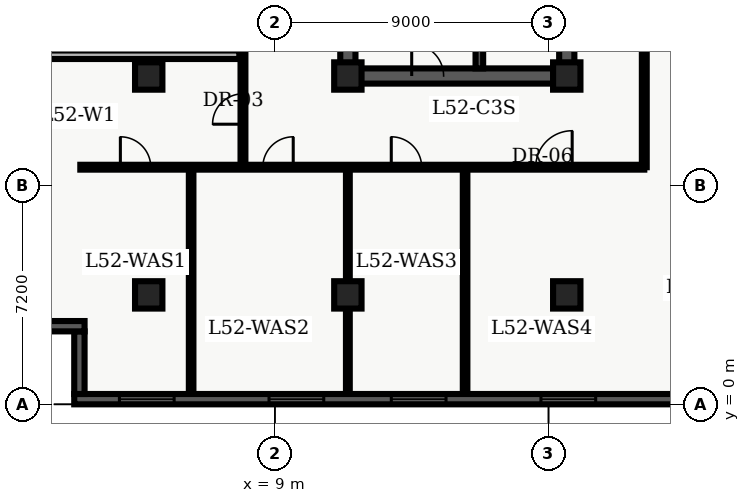
"""IFC4 building model, lengths in metres.
Left out: names, types, materials, properties, quantities, classifications, styles, units other than length and angle.
Written with IfcOpenShell. Run it as: python <this file> out.ifc"""

import sys

from ifc_helpers import new_model, entity, si_unit, converted_unit, direction, frame, origin_with_axes, origin_2d_with_axis, place, context, subcontext, project, spatial, polyline, rectangle, outline, extrude, element, fill, save


model = new_model("IFC4")
c1 = context("Model", 3, precision=1e-05, world=origin_with_axes(), true_north=direction((0.0, 1.0)))
c2 = subcontext(c1, "Body", "Model", "MODEL_VIEW")
j1 = project(units=[si_unit("LENGTHUNIT", "METRE"), converted_unit("PLANEANGLEUNIT", "DEGREE", entity("IfcPlaneAngleMeasure", 0.017), si_unit("PLANEANGLEUNIT", "RADIAN"), dimensions=[0, 0, 0, 0, 0, 0, 0])], contexts=[c1])
p1 = place(None, origin_with_axes())
s1 = spatial("IfcSite", under=j1, at=p1, CompositionType="ELEMENT")
p2 = place(p1, origin_with_axes())
s2 = spatial("IfcBuilding", under=s1, at=p2, CompositionType="ELEMENT")
p3 = place(p2, frame((0.0, 0.0, 212.1), z_axis=(0.0, 0.0, 1.0), x_axis=(1.0, 0.0, 0.0)))
s3 = spatial("IfcBuildingStorey", under=s2, at=p3, CompositionType="ELEMENT", Elevation=212.1)
p4 = place(p3, frame((11.4, 10.8, 0.0), z_axis=(0.0, 0.0, 1.0), x_axis=(0.0, 1.0, 0.0)))
e1 = element("IfcWall", 1, at=p4, inside=s3, PredefinedType="SHEAR", context=c2, shape_type="SweptSolid", body=[
    extrude(outline(polyline([(0.0, -0.25), (27.0, -0.25), (27.0, 0.25), (0.0, 0.25), (0.0, -0.25)])), origin_with_axes(), (0.0, 0.0, 1.0), 3.66),
])
p5 = place(p3, frame((11.4, 10.8, 0.0), z_axis=(0.0, 0.0, 1.0), x_axis=(1.0, 0.0, 0.0)))
e2 = element("IfcWall", 2, at=p5, inside=s3, PredefinedType="SHEAR", context=c2, shape_type="SweptSolid", body=[
    extrude(outline(polyline([(0.0, -0.25), (7.2, -0.25), (7.2, 0.25), (0.0, 0.25), (0.0, -0.25)])), origin_with_axes(), (0.0, 0.0, 1.0), 3.66),
])
p6 = place(p5, frame((2.625, 0.0, 0.0), z_axis=(0.0, 0.0, 1.0), x_axis=(1.0, 0.0, 0.0)))
e3 = element("IfcOpeningElement", 3, at=p6, cuts=e2, PredefinedType="OPENING", context=c2, shape_type="SweptSolid", body=[
    extrude(rectangle(XDim=1.05, YDim=0.52, at=origin_2d_with_axis()), origin_with_axes(), (0.0, 0.0, 1.0), 2.15),
])
p7 = place(p3, frame((18.6, 10.8, 0.0), z_axis=(0.0, 0.0, 1.0), x_axis=(0.0, 1.0, 0.0)))
e4 = element("IfcWall", 4, at=p7, inside=s3, PredefinedType="SHEAR", context=c2, shape_type="SweptSolid", body=[
    extrude(outline(polyline([(0.0, -0.25), (13.5, -0.25), (13.5, 0.25), (0.0, 0.25), (0.0, -0.25)])), origin_with_axes(), (0.0, 0.0, 1.0), 3.66),
])
p8 = place(p7, frame((11.125, 0.0, 0.0), z_axis=(0.0, 0.0, 1.0), x_axis=(1.0, 0.0, 0.0)))
e5 = element("IfcOpeningElement", 5, at=p8, cuts=e4, PredefinedType="OPENING", context=c2, shape_type="SweptSolid", body=[
    extrude(rectangle(XDim=1.05, YDim=0.52, at=origin_2d_with_axis()), origin_with_axes(), (0.0, 0.0, 1.0), 2.15),
])
p9 = place(p7, frame((2.125, 0.0, 0.0), z_axis=(0.0, 0.0, 1.0), x_axis=(1.0, 0.0, 0.0)))
e6 = element("IfcOpeningElement", 6, at=p9, cuts=e4, PredefinedType="OPENING", context=c2, shape_type="SweptSolid", body=[
    extrude(rectangle(XDim=0.95, YDim=0.52, at=origin_2d_with_axis()), origin_with_axes(), (0.0, 0.0, 1.0), 2.15),
])
p10 = place(p7, frame((6.275, 0.0, 0.0), z_axis=(0.0, 0.0, 1.0), x_axis=(1.0, 0.0, 0.0)))
e7 = element("IfcOpeningElement", 7, at=p10, cuts=e4, PredefinedType="OPENING", context=c2, shape_type="SweptSolid", body=[
    extrude(rectangle(XDim=0.95, YDim=0.52, at=origin_2d_with_axis()), origin_with_axes(), (0.0, 0.0, 1.0), 2.15),
])
p11 = place(p3, frame((15.725, 11.05, 0.0), z_axis=(0.0, 0.0, 1.0), x_axis=(0.0, 1.0, 0.0)))
e8 = element("IfcWall", 8, at=p11, inside=s3, PredefinedType="SHEAR", context=c2, shape_type="SweptSolid", body=[
    extrude(outline(polyline([(0.0, -0.125), (8.65, -0.125), (8.65, 0.125), (0.0, 0.125), (0.0, -0.125)])), origin_with_axes(), (0.0, 0.0, 1.0), 3.66),
])
for number, where, z_axis, x_axis in (
    (9, (11.4, 3.6, 0.0), (0.0, 0.0, 1.0), (1.0, 0.0, 0.0)),
    (10, (11.4, 10.8, 0.0), (0.0, 0.0, 1.0), (1.0, 0.0, 0.0)),
    (11, (18.6, 3.6, 0.0), (0.0, 0.0, 1.0), (1.0, 0.0, 0.0)),
    (12, (18.6, 10.8, 0.0), (0.0, 0.0, 1.0), (1.0, 0.0, 0.0)),
    (13, (4.85, 3.6, 0.0), (0.0, 0.0, 1.0), (1.0, 0.0, 0.0)),
    (14, (4.85, 10.8, 0.0), (0.0, 0.0, 1.0), (1.0, 0.0, 0.0)),
):
    element("IfcColumn", number, at=place(p3, frame(where, z_axis=z_axis, x_axis=x_axis)), inside=s3, PredefinedType="COLUMN", context=c2, shape_type="SweptSolid", body=[
        extrude(rectangle(XDim=0.9, YDim=0.9, at=origin_2d_with_axis()), origin_with_axes(), (0.0, 0.0, 1.0), 3.9),
    ])
p12 = place(p3, frame((2.6, 7.8, 0.0), z_axis=(0.0, 0.0, 1.0), x_axis=(1.0, 0.0, 0.0)))
e15 = element("IfcWall", 15, at=p12, inside=s3, PredefinedType="PARTITIONING", context=c2, shape_type="SweptSolid", body=[
    extrude(outline(polyline([(0.0, -0.08), (18.55, -0.08), (18.55, 0.08), (0.0, 0.08), (0.0, -0.08)])), origin_with_axes(), (0.0, 0.0, 1.0), 2.7),
])
p13 = place(p12, frame((1.817, 0.0, 0.0), z_axis=(0.0, 0.0, 1.0), x_axis=(1.0, 0.0, 0.0)))
e16 = element("IfcOpeningElement", 16, at=p13, cuts=e15, PredefinedType="OPENING", context=c2, shape_type="SweptSolid", body=[
    extrude(rectangle(XDim=1.0, YDim=0.18, at=origin_2d_with_axis()), origin_with_axes(), (0.0, 0.0, 1.0), 2.15),
])
p14 = place(p12, frame((6.503, 0.0, 0.0), z_axis=(0.0, 0.0, 1.0), x_axis=(1.0, 0.0, 0.0)))
e17 = element("IfcOpeningElement", 17, at=p14, cuts=e15, PredefinedType="OPENING", context=c2, shape_type="SweptSolid", body=[
    extrude(rectangle(XDim=1.0, YDim=0.18, at=origin_2d_with_axis()), origin_with_axes(), (0.0, 0.0, 1.0), 2.15),
])
p15 = place(p12, frame((10.728, 0.0, 0.0), z_axis=(0.0, 0.0, 1.0), x_axis=(1.0, 0.0, 0.0)))
e18 = element("IfcOpeningElement", 18, at=p15, cuts=e15, PredefinedType="OPENING", context=c2, shape_type="SweptSolid", body=[
    extrude(rectangle(XDim=1.0, YDim=0.18, at=origin_2d_with_axis()), origin_with_axes(), (0.0, 0.0, 1.0), 2.15),
])
p16 = place(p12, frame((15.578, 0.0, 0.0), z_axis=(0.0, 0.0, 1.0), x_axis=(1.0, 0.0, 0.0)))
e19 = element("IfcOpeningElement", 19, at=p16, cuts=e15, PredefinedType="OPENING", context=c2, shape_type="SweptSolid", body=[
    extrude(rectangle(XDim=1.2, YDim=0.18, at=origin_2d_with_axis()), origin_with_axes(), (0.0, 0.0, 1.0), 2.2),
])
p17 = place(p3, frame((21.15, 7.8, 0.0), z_axis=(0.0, 0.0, 1.0), x_axis=(0.0, 1.0, 0.0)))
e20 = element("IfcWall", 20, at=p17, inside=s3, PredefinedType="PARTITIONING", context=c2, shape_type="SweptSolid", body=[
    extrude(outline(polyline([(0.0, -0.08), (32.7, -0.08), (32.7, 0.08), (0.0, 0.08), (0.0, -0.08)])), origin_with_axes(), (0.0, 0.0, 1.0), 2.7),
])
p18 = place(p17, frame((18.399, 0.0, 0.0), z_axis=(0.0, 0.0, 1.0), x_axis=(1.0, 0.0, 0.0)))
e21 = element("IfcOpeningElement", 21, at=p18, cuts=e20, PredefinedType="OPENING", context=c2, shape_type="SweptSolid", body=[
    extrude(rectangle(XDim=1.0, YDim=0.18, at=origin_2d_with_axis()), origin_with_axes(), (0.0, 0.0, 1.0), 2.15),
])
p19 = place(p17, frame((25.06, 0.0, 0.0), z_axis=(0.0, 0.0, 1.0), x_axis=(1.0, 0.0, 0.0)))
e22 = element("IfcOpeningElement", 22, at=p19, cuts=e20, PredefinedType="OPENING", context=c2, shape_type="SweptSolid", body=[
    extrude(rectangle(XDim=1.0, YDim=0.18, at=origin_2d_with_axis()), origin_with_axes(), (0.0, 0.0, 1.0), 2.15),
])
p20 = place(p17, frame((29.911, 0.0, 0.0), z_axis=(0.0, 0.0, 1.0), x_axis=(1.0, 0.0, 0.0)))
e23 = element("IfcOpeningElement", 23, at=p20, cuts=e20, PredefinedType="OPENING", context=c2, shape_type="SweptSolid", body=[
    extrude(rectangle(XDim=1.0, YDim=0.18, at=origin_2d_with_axis()), origin_with_axes(), (0.0, 0.0, 1.0), 2.15),
])
p21 = place(p17, frame((5.775, 0.0, 0.0), z_axis=(0.0, 0.0, 1.0), x_axis=(1.0, 0.0, 0.0)))
e24 = element("IfcOpeningElement", 24, at=p21, cuts=e20, PredefinedType="OPENING", context=c2, shape_type="SweptSolid", body=[
    extrude(rectangle(XDim=1.05, YDim=0.18, at=origin_2d_with_axis()), origin_with_axes(), (0.0, 0.0, 1.0), 2.15),
])
p22 = place(p3, frame((7.95, 7.8, 0.0), z_axis=(0.0, 0.0, 1.0), x_axis=(0.0, 1.0, 0.0)))
e25 = element("IfcWall", 25, at=p22, inside=s3, PredefinedType="PARTITIONING", context=c2, shape_type="SweptSolid", body=[
    extrude(outline(polyline([(0.0, -0.08), (32.7, -0.08), (32.7, 0.08), (0.0, 0.08), (0.0, -0.08)])), origin_with_axes(), (0.0, 0.0, 1.0), 2.7),
])
p23 = place(p22, frame((1.915, 0.0, 0.0), z_axis=(0.0, 0.0, 1.0), x_axis=(1.0, 0.0, 0.0)))
e26 = element("IfcOpeningElement", 26, at=p23, cuts=e25, PredefinedType="OPENING", context=c2, shape_type="SweptSolid", body=[
    extrude(rectangle(XDim=1.0, YDim=0.18, at=origin_2d_with_axis()), origin_with_axes(), (0.0, 0.0, 1.0), 2.15),
])
p24 = place(p22, frame((5.705, 0.0, 0.0), z_axis=(0.0, 0.0, 1.0), x_axis=(1.0, 0.0, 0.0)))
e27 = element("IfcOpeningElement", 27, at=p24, cuts=e25, PredefinedType="OPENING", context=c2, shape_type="SweptSolid", body=[
    extrude(rectangle(XDim=1.0, YDim=0.18, at=origin_2d_with_axis()), origin_with_axes(), (0.0, 0.0, 1.0), 2.15),
])
p25 = place(p22, frame((10.066, 0.0, 0.0), z_axis=(0.0, 0.0, 1.0), x_axis=(1.0, 0.0, 0.0)))
e28 = element("IfcOpeningElement", 28, at=p25, cuts=e25, PredefinedType="OPENING", context=c2, shape_type="SweptSolid", body=[
    extrude(rectangle(XDim=1.0, YDim=0.18, at=origin_2d_with_axis()), origin_with_axes(), (0.0, 0.0, 1.0), 2.15),
])
p26 = place(p22, frame((15.195, 0.0, 0.0), z_axis=(0.0, 0.0, 1.0), x_axis=(1.0, 0.0, 0.0)))
e29 = element("IfcOpeningElement", 29, at=p26, cuts=e25, PredefinedType="OPENING", context=c2, shape_type="SweptSolid", body=[
    extrude(rectangle(XDim=1.0, YDim=0.18, at=origin_2d_with_axis()), origin_with_axes(), (0.0, 0.0, 1.0), 2.15),
])
p27 = place(p22, frame((21.311, 0.0, 0.0), z_axis=(0.0, 0.0, 1.0), x_axis=(1.0, 0.0, 0.0)))
e30 = element("IfcOpeningElement", 30, at=p27, cuts=e25, PredefinedType="OPENING", context=c2, shape_type="SweptSolid", body=[
    extrude(rectangle(XDim=1.0, YDim=0.18, at=origin_2d_with_axis()), origin_with_axes(), (0.0, 0.0, 1.0), 2.15),
])
p28 = place(p22, frame((28.611, 0.0, 0.0), z_axis=(0.0, 0.0, 1.0), x_axis=(1.0, 0.0, 0.0)))
e31 = element("IfcOpeningElement", 31, at=p28, cuts=e25, PredefinedType="OPENING", context=c2, shape_type="SweptSolid", body=[
    extrude(rectangle(XDim=1.0, YDim=0.18, at=origin_2d_with_axis()), origin_with_axes(), (0.0, 0.0, 1.0), 2.15),
])
p29 = place(p3, frame((0.335, 11.499, 0.0), z_axis=(0.0, 0.0, 1.0), x_axis=(1.0, 0.0, 0.0)))
e32 = element("IfcWall", 32, at=p29, inside=s3, PredefinedType="PARTITIONING", context=c2, shape_type="SweptSolid", body=[
    extrude(outline(polyline([(0.0, -0.14), (7.495, -0.14), (7.495, 0.14), (0.0, 0.14), (0.0, -0.14)])), origin_with_axes(), (0.0, 0.0, 1.0), 2.7),
])
p30 = place(p3, frame((6.245, 0.335, 0.0), z_axis=(0.0, 0.0, 1.0), x_axis=(0.0, 1.0, 0.0)))
e33 = element("IfcWall", 33, at=p30, inside=s3, PredefinedType="PARTITIONING", context=c2, shape_type="SweptSolid", body=[
    extrude(outline(polyline([(0.0, -0.075), (7.365, -0.075), (7.365, 0.075), (0.0, 0.075), (0.0, -0.075)])), origin_with_axes(), (0.0, 0.0, 1.0), 2.7),
])
p31 = place(p3, frame((11.4, 0.335, 0.0), z_axis=(0.0, 0.0, 1.0), x_axis=(0.0, 1.0, 0.0)))
e34 = element("IfcWall", 34, at=p31, inside=s3, PredefinedType="PARTITIONING", context=c2, shape_type="SweptSolid", body=[
    extrude(outline(polyline([(0.0, -0.062), (7.365, -0.062), (7.365, 0.062), (0.0, 0.062), (0.0, -0.062)])), origin_with_axes(), (0.0, 0.0, 1.0), 2.7),
])
p32 = place(p3, frame((15.256, 0.335, 0.0), z_axis=(0.0, 0.0, 1.0), x_axis=(0.0, 1.0, 0.0)))
e35 = element("IfcWall", 35, at=p32, inside=s3, PredefinedType="PARTITIONING", context=c2, shape_type="SweptSolid", body=[
    extrude(outline(polyline([(0.0, -0.075), (7.365, -0.075), (7.365, 0.075), (0.0, 0.075), (0.0, -0.075)])), origin_with_axes(), (0.0, 0.0, 1.0), 2.7),
])
p33 = place(p3, frame((57.26, 0.17, 0.0), z_axis=(0.0, 0.0, 1.0), x_axis=(-1.0, 0.0, 0.0)))
e36 = element("IfcWall", 36, at=p33, inside=s3, PredefinedType="SOLIDWALL", context=c2, shape_type="SweptSolid", body=[
    extrude(outline(polyline([(0.0, -0.17), (54.86, -0.17), (54.86, 0.17), (0.0, 0.17), (0.0, -0.17)])), origin_with_axes(), (0.0, 0.0, 1.0), 3.66),
])
p34 = place(p33, frame((2.836, 0.0, 0.45), z_axis=(0.0, 0.0, 1.0), x_axis=(1.0, 0.0, 0.0)))
e37 = element("IfcOpeningElement", 37, at=p34, cuts=e36, PredefinedType="OPENING", context=c2, shape_type="SweptSolid", body=[
    extrude(rectangle(XDim=1.8, YDim=0.36, at=origin_2d_with_axis()), origin_with_axes(), (0.0, 0.0, 1.0), 2.1),
])
p35 = place(p33, frame((7.307, 0.0, 0.45), z_axis=(0.0, 0.0, 1.0), x_axis=(1.0, 0.0, 0.0)))
e38 = element("IfcOpeningElement", 38, at=p35, cuts=e36, PredefinedType="OPENING", context=c2, shape_type="SweptSolid", body=[
    extrude(rectangle(XDim=1.8, YDim=0.36, at=origin_2d_with_axis()), origin_with_axes(), (0.0, 0.0, 1.0), 2.1),
])
p36 = place(p33, frame((11.779, 0.0, 0.45), z_axis=(0.0, 0.0, 1.0), x_axis=(1.0, 0.0, 0.0)))
e39 = element("IfcOpeningElement", 39, at=p36, cuts=e36, PredefinedType="OPENING", context=c2, shape_type="SweptSolid", body=[
    extrude(rectangle(XDim=1.8, YDim=0.36, at=origin_2d_with_axis()), origin_with_axes(), (0.0, 0.0, 1.0), 2.1),
])
p37 = place(p33, frame((16.251, 0.0, 0.45), z_axis=(0.0, 0.0, 1.0), x_axis=(1.0, 0.0, 0.0)))
e40 = element("IfcOpeningElement", 40, at=p37, cuts=e36, PredefinedType="OPENING", context=c2, shape_type="SweptSolid", body=[
    extrude(rectangle(XDim=1.8, YDim=0.36, at=origin_2d_with_axis()), origin_with_axes(), (0.0, 0.0, 1.0), 2.1),
])
p38 = place(p33, frame((20.723, 0.0, 0.45), z_axis=(0.0, 0.0, 1.0), x_axis=(1.0, 0.0, 0.0)))
e41 = element("IfcOpeningElement", 41, at=p38, cuts=e36, PredefinedType="OPENING", context=c2, shape_type="SweptSolid", body=[
    extrude(rectangle(XDim=1.8, YDim=0.36, at=origin_2d_with_axis()), origin_with_axes(), (0.0, 0.0, 1.0), 2.1),
])
p39 = place(p33, frame((25.194, 0.0, 0.45), z_axis=(0.0, 0.0, 1.0), x_axis=(1.0, 0.0, 0.0)))
e42 = element("IfcOpeningElement", 42, at=p39, cuts=e36, PredefinedType="OPENING", context=c2, shape_type="SweptSolid", body=[
    extrude(rectangle(XDim=1.8, YDim=0.36, at=origin_2d_with_axis()), origin_with_axes(), (0.0, 0.0, 1.0), 2.1),
])
p40 = place(p33, frame((29.666, 0.0, 0.45), z_axis=(0.0, 0.0, 1.0), x_axis=(1.0, 0.0, 0.0)))
e43 = element("IfcOpeningElement", 43, at=p40, cuts=e36, PredefinedType="OPENING", context=c2, shape_type="SweptSolid", body=[
    extrude(rectangle(XDim=1.8, YDim=0.36, at=origin_2d_with_axis()), origin_with_axes(), (0.0, 0.0, 1.0), 2.1),
])
p41 = place(p33, frame((34.138, 0.0, 0.45), z_axis=(0.0, 0.0, 1.0), x_axis=(1.0, 0.0, 0.0)))
e44 = element("IfcOpeningElement", 44, at=p41, cuts=e36, PredefinedType="OPENING", context=c2, shape_type="SweptSolid", body=[
    extrude(rectangle(XDim=1.8, YDim=0.36, at=origin_2d_with_axis()), origin_with_axes(), (0.0, 0.0, 1.0), 2.1),
])
p42 = place(p33, frame((38.609, 0.0, 0.45), z_axis=(0.0, 0.0, 1.0), x_axis=(1.0, 0.0, 0.0)))
e45 = element("IfcOpeningElement", 45, at=p42, cuts=e36, PredefinedType="OPENING", context=c2, shape_type="SweptSolid", body=[
    extrude(rectangle(XDim=1.8, YDim=0.36, at=origin_2d_with_axis()), origin_with_axes(), (0.0, 0.0, 1.0), 2.1),
])
p43 = place(p33, frame((43.531, 0.0, 0.45), z_axis=(0.0, 0.0, 1.0), x_axis=(1.0, 0.0, 0.0)))
e46 = element("IfcOpeningElement", 46, at=p43, cuts=e36, PredefinedType="OPENING", context=c2, shape_type="SweptSolid", body=[
    extrude(rectangle(XDim=1.8, YDim=0.36, at=origin_2d_with_axis()), origin_with_axes(), (0.0, 0.0, 1.0), 2.1),
])
p44 = place(p33, frame((47.553, 0.0, 0.45), z_axis=(0.0, 0.0, 1.0), x_axis=(1.0, 0.0, 0.0)))
e47 = element("IfcOpeningElement", 47, at=p44, cuts=e36, PredefinedType="OPENING", context=c2, shape_type="SweptSolid", body=[
    extrude(rectangle(XDim=1.8, YDim=0.36, at=origin_2d_with_axis()), origin_with_axes(), (0.0, 0.0, 1.0), 2.1),
])
p45 = place(p33, frame((52.474, 0.0, 0.45), z_axis=(0.0, 0.0, 1.0), x_axis=(1.0, 0.0, 0.0)))
e48 = element("IfcOpeningElement", 48, at=p45, cuts=e36, PredefinedType="OPENING", context=c2, shape_type="SweptSolid", body=[
    extrude(rectangle(XDim=1.8, YDim=0.36, at=origin_2d_with_axis()), origin_with_axes(), (0.0, 0.0, 1.0), 2.1),
])
p46 = place(p3, frame((2.57, 0.34, 0.0), z_axis=(0.0, 0.0, 1.0), x_axis=(0.0, 1.0, 0.0)))
e49 = element("IfcWall", 49, at=p46, inside=s3, PredefinedType="SOLIDWALL", context=c2, shape_type="SweptSolid", body=[
    extrude(outline(polyline([(0.0, -0.17), (2.06, -0.17), (2.06, 0.17), (0.0, 0.17), (0.0, -0.17)])), origin_with_axes(), (0.0, 0.0, 1.0), 3.66),
])
p47 = place(p3, frame((2.74, 2.57, 0.0), z_axis=(0.0, 0.0, 1.0), x_axis=(-1.0, 0.0, 0.0)))
e50 = element("IfcWall", 50, at=p47, inside=s3, PredefinedType="SOLIDWALL", context=c2, shape_type="SweptSolid", body=[
    extrude(outline(polyline([(0.0, -0.17), (2.74, -0.17), (2.74, 0.17), (0.0, 0.17), (0.0, -0.17)])), origin_with_axes(), (0.0, 0.0, 1.0), 3.66),
])
p48 = place(p5, frame((2.625, 0.0, 0.0), z_axis=(0.0, 0.0, 1.0), x_axis=(1.0, 0.0, 0.0)))
e51 = element("IfcDoor", 51, at=p48, inside=s3, OperationType="SINGLE_SWING_LEFT", PredefinedType="DOOR", context=c2, shape_type="SweptSolid", body=[
    extrude(rectangle(XDim=1.05, YDim=0.09, at=origin_2d_with_axis()), origin_with_axes(), (0.0, 0.0, 1.0), 2.15),
])
fill(e3, e51)
p49 = place(p22, frame((1.915, 0.0, 0.0), z_axis=(0.0, 0.0, 1.0), x_axis=(1.0, 0.0, 0.0)))
e52 = element("IfcDoor", 52, at=p49, inside=s3, OperationType="SINGLE_SWING_LEFT", PredefinedType="DOOR", context=c2, shape_type="SweptSolid", body=[
    extrude(rectangle(XDim=1.0, YDim=0.09, at=origin_2d_with_axis()), origin_with_axes(), (0.0, 0.0, 1.0), 2.15),
])
fill(e26, e52)
p50 = place(p12, frame((1.817, 0.0, 0.0), z_axis=(0.0, 0.0, 1.0), x_axis=(1.0, 0.0, 0.0)))
e53 = element("IfcDoor", 53, at=p50, inside=s3, OperationType="SINGLE_SWING_LEFT", PredefinedType="DOOR", context=c2, shape_type="SweptSolid", body=[
    extrude(rectangle(XDim=1.0, YDim=0.09, at=origin_2d_with_axis()), origin_with_axes(), (0.0, 0.0, 1.0), 2.15),
])
fill(e16, e53)
p51 = place(p12, frame((6.503, 0.0, 0.0), z_axis=(0.0, 0.0, 1.0), x_axis=(1.0, 0.0, 0.0)))
e54 = element("IfcDoor", 54, at=p51, inside=s3, OperationType="SINGLE_SWING_RIGHT", PredefinedType="DOOR", context=c2, shape_type="SweptSolid", body=[
    extrude(rectangle(XDim=1.0, YDim=0.09, at=origin_2d_with_axis()), origin_with_axes(), (0.0, 0.0, 1.0), 2.15),
])
fill(e17, e54)
p52 = place(p12, frame((10.728, 0.0, 0.0), z_axis=(0.0, 0.0, 1.0), x_axis=(1.0, 0.0, 0.0)))
e55 = element("IfcDoor", 55, at=p52, inside=s3, OperationType="SINGLE_SWING_LEFT", PredefinedType="DOOR", context=c2, shape_type="SweptSolid", body=[
    extrude(rectangle(XDim=1.0, YDim=0.09, at=origin_2d_with_axis()), origin_with_axes(), (0.0, 0.0, 1.0), 2.15),
])
fill(e18, e55)
p53 = place(p12, frame((15.578, 0.0, 0.0), z_axis=(0.0, 0.0, 1.0), x_axis=(1.0, 0.0, 0.0)))
e56 = element("IfcDoor", 56, at=p53, inside=s3, OperationType="SINGLE_SWING_RIGHT", PredefinedType="DOOR", context=c2, shape_type="SweptSolid", body=[
    extrude(rectangle(XDim=1.2, YDim=0.09, at=origin_2d_with_axis()), origin_with_axes(), (0.0, 0.0, 1.0), 2.2),
])
fill(e19, e56)
p54 = place(p33, frame((38.609, 0.0, 0.45), z_axis=(0.0, 0.0, 1.0), x_axis=(1.0, 0.0, 0.0)))
e57 = element("IfcWindow", 57, at=p54, inside=s3, PredefinedType="WINDOW", context=c2, shape_type="SweptSolid", body=[
    extrude(rectangle(XDim=1.8, YDim=0.09, at=origin_2d_with_axis()), origin_with_axes(), (0.0, 0.0, 1.0), 2.1),
])
fill(e45, e57)
p55 = place(p33, frame((43.531, 0.0, 0.45), z_axis=(0.0, 0.0, 1.0), x_axis=(1.0, 0.0, 0.0)))
e58 = element("IfcWindow", 58, at=p55, inside=s3, PredefinedType="WINDOW", context=c2, shape_type="SweptSolid", body=[
    extrude(rectangle(XDim=1.8, YDim=0.09, at=origin_2d_with_axis()), origin_with_axes(), (0.0, 0.0, 1.0), 2.1),
])
fill(e46, e58)
p56 = place(p33, frame((47.553, 0.0, 0.45), z_axis=(0.0, 0.0, 1.0), x_axis=(1.0, 0.0, 0.0)))
e59 = element("IfcWindow", 59, at=p56, inside=s3, PredefinedType="WINDOW", context=c2, shape_type="SweptSolid", body=[
    extrude(rectangle(XDim=1.8, YDim=0.09, at=origin_2d_with_axis()), origin_with_axes(), (0.0, 0.0, 1.0), 2.1),
])
fill(e47, e59)
p57 = place(p33, frame((52.474, 0.0, 0.45), z_axis=(0.0, 0.0, 1.0), x_axis=(1.0, 0.0, 0.0)))
e60 = element("IfcWindow", 60, at=p57, inside=s3, PredefinedType="WINDOW", context=c2, shape_type="SweptSolid", body=[
    extrude(rectangle(XDim=1.8, YDim=0.09, at=origin_2d_with_axis()), origin_with_axes(), (0.0, 0.0, 1.0), 2.1),
])
fill(e48, e60)
save(model, sys.argv[1])
